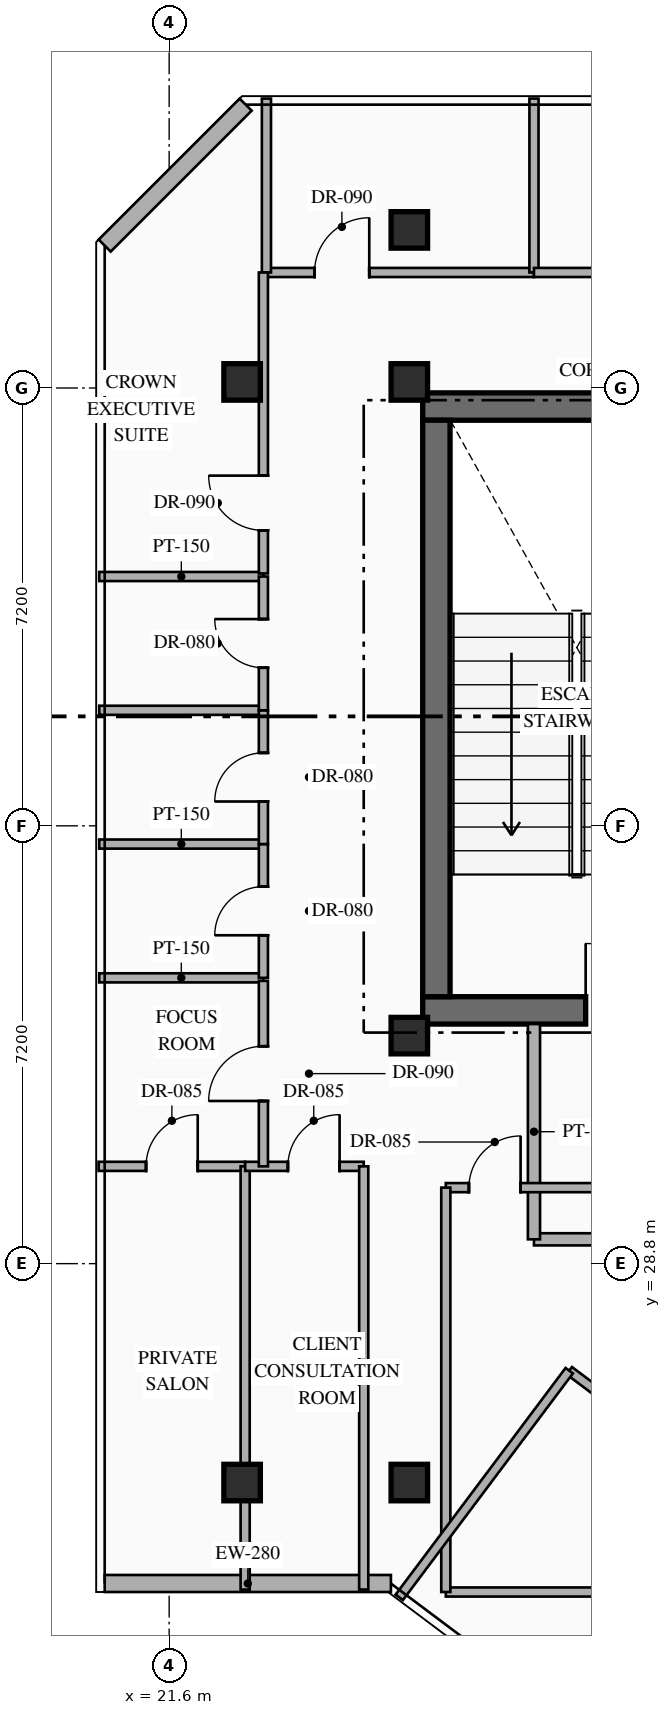
"""IFC4 building model, lengths in metres.
Left out: names, types, materials, properties, quantities, classifications, styles, units other than length and angle.
Written with IfcOpenShell. Run it as: python <this file> out.ifc"""

import sys

from ifc_helpers import new_model, si_unit, direction, frame, frame_2d, origin, origin_2d, place, context, subcontext, project, spatial, rectangle, hollow_rectangle, extrude, element, fill, save


model = new_model("IFC4")
c1 = context("Model", 3, precision=1e-05, world=origin(), true_north=direction((0.0, 1.0)))
c2 = subcontext(c1, "Body", "Model", "MODEL_VIEW")
j1 = project(units=[si_unit("LENGTHUNIT", "METRE"), si_unit("PLANEANGLEUNIT", "RADIAN")], contexts=[c1])
p1 = place(None, origin())
s1 = spatial("IfcSite", under=j1, at=p1, CompositionType="ELEMENT")
p2 = place(p1, origin())
s2 = spatial("IfcBuilding", under=s1, at=p2, CompositionType="ELEMENT")
p3 = place(p2, frame((0.0, 0.0, 273.95)))
s3 = spatial("IfcBuildingStorey", under=s2, at=p3, CompositionType="ELEMENT", Elevation=273.95)
p4 = place(p3, frame((25.77, 32.965, 0.0), z_axis=(0.0, 0.0, 1.0), x_axis=(1.0, 0.0, 0.0)))
e1 = element("IfcWall", 1, at=p4, inside=s3, PredefinedType="SHEAR", context=c2, shape_type="SweptSolid", body=[
    extrude(rectangle(XDim=7.48, YDim=0.45, at=frame_2d((3.74, 0.0))), origin(), (0.0, 0.0, 1.0), 4.0),
])
p5 = place(p4, frame((2.68, 0.0, 0.0)))
e2 = element("IfcOpeningElement", 2, at=p5, cuts=e1, PredefinedType="OPENING", context=c2, shape_type="SweptSolid", body=[
    extrude(rectangle(XDim=1.1, YDim=2.2, at=frame_2d((0.55, 1.1))), frame((0.0, 0.235, 0.0), z_axis=(0.0, -1.0, 0.0), x_axis=(1.0, 0.0, 0.0)), (0.0, 0.0, 1.0), 0.47),
])
p6 = place(p4, frame((5.43, 0.0, 0.0)))
e3 = element("IfcOpeningElement", 3, at=p6, cuts=e1, PredefinedType="OPENING", context=c2, shape_type="SweptSolid", body=[
    extrude(rectangle(XDim=1.1, YDim=2.15, at=frame_2d((0.55, 1.075))), frame((0.0, 0.235, 0.0), z_axis=(0.0, -1.0, 0.0), x_axis=(1.0, 0.0, 0.0)), (0.0, 0.0, 1.0), 0.47),
])
p7 = place(p3, frame((25.77, 42.895, 0.0), z_axis=(0.0, 0.0, 1.0), x_axis=(1.0, 0.0, 0.0)))
e4 = element("IfcWall", 4, at=p7, inside=s3, PredefinedType="SHEAR", context=c2, shape_type="SweptSolid", body=[
    extrude(rectangle(XDim=7.48, YDim=0.45, at=frame_2d((3.74, 0.0))), origin(), (0.0, 0.0, 1.0), 4.0),
])
p8 = place(p3, frame((25.995, 33.19, 0.0), z_axis=(0.0, 0.0, 1.0), x_axis=(0.0, 1.0, 0.0)))
e5 = element("IfcWall", 5, at=p8, inside=s3, PredefinedType="SHEAR", context=c2, shape_type="SweptSolid", body=[
    extrude(rectangle(XDim=9.48, YDim=0.45, at=frame_2d((4.74, 0.0))), origin(), (0.0, 0.0, 1.0), 4.0),
])
for number, where, z_axis, x_axis in (
    (6, (25.55, 32.55, 0.0), (0.0, 0.0, 1.0), (1.0, 0.0, 0.0)),
    (7, (25.55, 43.3, 0.0), (0.0, 0.0, 1.0), (1.0, 0.0, 0.0)),
    (8, (25.55, 25.2, 0.0), (0.0, 0.0, 1.0), (1.0, 0.0, 0.0)),
    (9, (25.55, 45.8, 0.0), (0.0, 0.0, 1.0), (1.0, 0.0, 0.0)),
    (10, (22.8, 25.2, 0.0), (0.0, 0.0, 1.0), (1.0, 0.0, 0.0)),
    (11, (22.8, 43.3, 0.0), (0.0, 0.0, 1.0), (1.0, 0.0, 0.0)),
):
    element("IfcColumn", number, at=place(p3, frame(where, z_axis=z_axis, x_axis=x_axis)), inside=s3, PredefinedType="COLUMN", context=c2, shape_type="SweptSolid", body=[
        extrude(hollow_rectangle(XDim=0.6, YDim=0.6, WallThickness=0.025, at=origin_2d()), origin(), (0.0, 0.0, 1.0), 4.0),
    ])
p9 = place(p3, frame((25.247, 23.54, 0.0), z_axis=(0.0, 0.0, 1.0), x_axis=(-1.0, 0.0, 0.0)))
e12 = element("IfcWall", 12, at=p9, inside=s3, PredefinedType="STANDARD", context=c2, shape_type="SweptSolid", body=[
    extrude(rectangle(XDim=4.707, YDim=0.28, at=frame_2d((2.354, 0.0))), origin(), (0.0, 0.0, 1.0), 3.75),
])
p10 = place(p3, frame((20.54, 45.542, 0.0), z_axis=(0.0, 0.0, 1.0), x_axis=(0.707069542501, 0.707144017911, 0.0)))
e13 = element("IfcWall", 13, at=p10, inside=s3, PredefinedType="STANDARD", context=c2, shape_type="SweptSolid", body=[
    extrude(rectangle(XDim=3.278, YDim=0.28, at=frame_2d((1.639, 0.0))), origin(), (0.0, 0.0, 1.0), 3.75),
])
p11 = place(p3, frame((27.6, 29.2, 0.0), z_axis=(0.0, 0.0, 1.0), x_axis=(1.0, 0.0, 0.0)))
e14 = element("IfcWall", 14, at=p11, inside=s3, PredefinedType="STANDARD", context=c2, shape_type="SweptSolid", body=[
    extrude(rectangle(XDim=5.15, YDim=0.2, at=frame_2d((2.575, 0.0))), origin(), (0.0, 0.0, 1.0), 3.75),
])
p12 = place(p3, frame((27.6, 29.2, 0.0), z_axis=(0.0, 0.0, 1.0), x_axis=(0.0, 1.0, 0.0)))
e15 = element("IfcWall", 15, at=p12, inside=s3, PredefinedType="STANDARD", context=c2, shape_type="SweptSolid", body=[
    extrude(rectangle(XDim=3.54, YDim=0.2, at=frame_2d((1.77, 0.0))), origin(), (0.0, 0.0, 1.0), 3.75),
])
for number, where, z_axis, x_axis in (
    (16, (20.45, 33.5, 0.0), (0.0, 0.0, 1.0), (1.0, 0.0, 0.0)),
    (17, (20.45, 40.1, 0.0), (0.0, 0.0, 1.0), (1.0, 0.0, 0.0)),
    (18, (20.45, 35.7, 0.0), (0.0, 0.0, 1.0), (1.0, 0.0, 0.0)),
    (19, (20.45, 37.9, 0.0), (0.0, 0.0, 1.0), (1.0, 0.0, 0.0)),
):
    element("IfcWall", number, at=place(p3, frame(where, z_axis=z_axis, x_axis=x_axis)), inside=s3, PredefinedType="PARTITIONING", context=c2, shape_type="SweptSolid", body=[
        extrude(rectangle(XDim=2.7, YDim=0.15, at=frame_2d((1.35, 0.0))), origin(), (0.0, 0.0, 1.0), 3.75),
    ])
p13 = place(p3, frame((23.15, 33.5, 0.0), z_axis=(0.0, 0.0, 1.0), x_axis=(0.0, 1.0, 0.0)))
e20 = element("IfcWall", 20, at=p13, inside=s3, PredefinedType="PARTITIONING", context=c2, shape_type="SweptSolid", body=[
    extrude(rectangle(XDim=2.2, YDim=0.15, at=frame_2d((1.1, 0.0))), origin(), (0.0, 0.0, 1.0), 3.75),
])
p14 = place(p13, frame((0.7, 0.0, 0.0)))
e21 = element("IfcOpeningElement", 21, at=p14, cuts=e20, PredefinedType="OPENING", context=c2, shape_type="SweptSolid", body=[
    extrude(rectangle(XDim=0.8, YDim=2.06, at=frame_2d((0.4, 1.03))), frame((0.0, 0.085, 0.0), z_axis=(0.0, -1.0, 0.0), x_axis=(1.0, 0.0, 0.0)), (0.0, 0.0, 1.0), 0.17),
])
p15 = place(p3, frame((23.15, 35.7, 0.0), z_axis=(0.0, 0.0, 1.0), x_axis=(0.0, 1.0, 0.0)))
e22 = element("IfcWall", 22, at=p15, inside=s3, PredefinedType="PARTITIONING", context=c2, shape_type="SweptSolid", body=[
    extrude(rectangle(XDim=2.2, YDim=0.15, at=frame_2d((1.1, 0.0))), origin(), (0.0, 0.0, 1.0), 3.75),
])
p16 = place(p15, frame((0.7, 0.0, 0.0)))
e23 = element("IfcOpeningElement", 23, at=p16, cuts=e22, PredefinedType="OPENING", context=c2, shape_type="SweptSolid", body=[
    extrude(rectangle(XDim=0.8, YDim=2.06, at=frame_2d((0.4, 1.03))), frame((0.0, 0.085, 0.0), z_axis=(0.0, -1.0, 0.0), x_axis=(1.0, 0.0, 0.0)), (0.0, 0.0, 1.0), 0.17),
])
p17 = place(p3, frame((23.15, 37.9, 0.0), z_axis=(0.0, 0.0, 1.0), x_axis=(0.0, 1.0, 0.0)))
e24 = element("IfcWall", 24, at=p17, inside=s3, PredefinedType="PARTITIONING", context=c2, shape_type="SweptSolid", body=[
    extrude(rectangle(XDim=2.2, YDim=0.15, at=frame_2d((1.1, 0.0))), origin(), (0.0, 0.0, 1.0), 3.75),
])
p18 = place(p17, frame((0.7, 0.0, 0.0)))
e25 = element("IfcOpeningElement", 25, at=p18, cuts=e24, PredefinedType="OPENING", context=c2, shape_type="SweptSolid", body=[
    extrude(rectangle(XDim=0.8, YDim=2.06, at=frame_2d((0.4, 1.03))), frame((0.0, 0.085, 0.0), z_axis=(0.0, -1.0, 0.0), x_axis=(1.0, 0.0, 0.0)), (0.0, 0.0, 1.0), 0.17),
])
p19 = place(p3, frame((26.15, 23.4, 0.0), z_axis=(0.0, 0.0, 1.0), x_axis=(1.0, 0.0, 0.0)))
e26 = element("IfcWall", 26, at=p19, inside=s3, PredefinedType="PARTITIONING", context=c2, shape_type="SweptSolid", body=[
    extrude(rectangle(XDim=7.7, YDim=0.15, at=frame_2d((3.85, 0.0))), origin(), (0.0, 0.0, 1.0), 3.75),
])
p20 = place(p3, frame((26.15, 30.05, 0.0), z_axis=(0.0, 0.0, 1.0), x_axis=(1.0, 0.0, 0.0)))
e27 = element("IfcWall", 27, at=p20, inside=s3, PredefinedType="PARTITIONING", context=c2, shape_type="SweptSolid", body=[
    extrude(rectangle(XDim=7.7, YDim=0.15, at=frame_2d((3.85, 0.0))), origin(), (0.0, 0.0, 1.0), 3.75),
])
p21 = place(p20, frame((0.38, 0.0, 0.0)))
e28 = element("IfcOpeningElement", 28, at=p21, cuts=e27, PredefinedType="OPENING", context=c2, shape_type="SweptSolid", body=[
    extrude(rectangle(XDim=0.85, YDim=2.08, at=frame_2d((0.425, 1.04))), frame((0.0, 0.085, 0.0), z_axis=(0.0, -1.0, 0.0), x_axis=(1.0, 0.0, 0.0)), (0.0, 0.0, 1.0), 0.17),
])
p22 = place(p3, frame((26.15, 23.4, 0.0), z_axis=(0.0, 0.0, 1.0), x_axis=(0.0, 1.0, 0.0)))
e29 = element("IfcWall", 29, at=p22, inside=s3, PredefinedType="PARTITIONING", context=c2, shape_type="SweptSolid", body=[
    extrude(rectangle(XDim=6.65, YDim=0.15, at=frame_2d((3.325, 0.0))), origin(), (0.0, 0.0, 1.0), 3.75),
])
p23 = place(p3, frame((23.2, 45.1, 0.0), z_axis=(0.0, 0.0, 1.0), x_axis=(1.0, 0.0, 0.0)))
e30 = element("IfcWall", 30, at=p23, inside=s3, PredefinedType="PARTITIONING", context=c2, shape_type="SweptSolid", body=[
    extrude(rectangle(XDim=4.4, YDim=0.15, at=frame_2d((2.2, 0.0))), origin(), (0.0, 0.0, 1.0), 3.75),
])
p24 = place(p23, frame((0.791, 0.0, 0.0)))
e31 = element("IfcOpeningElement", 31, at=p24, cuts=e30, PredefinedType="OPENING", context=c2, shape_type="SweptSolid", body=[
    extrude(rectangle(XDim=0.9, YDim=2.15, at=frame_2d((0.45, 1.075))), frame((0.0, 0.085, 0.0), z_axis=(0.0, -1.0, 0.0), x_axis=(1.0, 0.0, 0.0)), (0.0, 0.0, 1.0), 0.17),
])
for number, where, z_axis, x_axis in (
    (32, (23.2, 45.1, 0.0), (0.0, 0.0, 1.0), (0.0, 1.0, 0.0)),
    (33, (27.6, 45.1, 0.0), (0.0, 0.0, 1.0), (0.0, 1.0, 0.0)),
):
    element("IfcWall", number, at=place(p3, frame(where, z_axis=z_axis, x_axis=x_axis)), inside=s3, PredefinedType="PARTITIONING", context=c2, shape_type="SweptSolid", body=[
        extrude(rectangle(XDim=2.86, YDim=0.15, at=frame_2d((1.43, 0.0))), origin(), (0.0, 0.0, 1.0), 3.75),
    ])
p25 = place(p3, frame((27.6, 45.1, 0.0), z_axis=(0.0, 0.0, 1.0), x_axis=(1.0, 0.0, 0.0)))
e34 = element("IfcWall", 34, at=p25, inside=s3, PredefinedType="PARTITIONING", context=c2, shape_type="SweptSolid", body=[
    extrude(rectangle(XDim=5.8, YDim=0.15, at=frame_2d((2.9, 0.0))), origin(), (0.0, 0.0, 1.0), 3.75),
])
p26 = place(p25, frame((2.45, 0.0, 0.0)))
e35 = element("IfcOpeningElement", 35, at=p26, cuts=e34, PredefinedType="OPENING", context=c2, shape_type="SweptSolid", body=[
    extrude(rectangle(XDim=0.9, YDim=2.15, at=frame_2d((0.45, 1.075))), frame((0.0, 0.085, 0.0), z_axis=(0.0, -1.0, 0.0), x_axis=(1.0, 0.0, 0.0)), (0.0, 0.0, 1.0), 0.17),
])
p27 = place(p3, frame((28.18, 27.04, 0.0), z_axis=(0.0, 0.0, 1.0), x_axis=(0.8, -0.6, 0.0)))
e36 = element("IfcWall", 36, at=p27, inside=s3, PredefinedType="PARTITIONING", context=c2, shape_type="SweptSolid", body=[
    extrude(rectangle(XDim=17.76, YDim=0.15, at=frame_2d((8.88, 0.0))), origin(), (0.0, 0.0, 1.0), 3.75),
])
p28 = place(p27, frame((11.65, 0.0, 0.0)))
e37 = element("IfcOpeningElement", 37, at=p28, cuts=e36, PredefinedType="OPENING", context=c2, shape_type="SweptSolid", body=[
    extrude(rectangle(XDim=0.9, YDim=2.15, at=frame_2d((0.45, 1.075))), frame((0.0, 0.085, 0.0), z_axis=(0.0, -1.0, 0.0), x_axis=(1.0, 0.0, 0.0)), (0.0, 0.0, 1.0), 0.17),
])
p29 = place(p3, frame((25.384, 23.312, 0.0), z_axis=(0.0, 0.0, 1.0), x_axis=(0.599983234706, 0.800012573696, 0.0)))
e38 = element("IfcWall", 38, at=p29, inside=s3, PredefinedType="PARTITIONING", context=c2, shape_type="SweptSolid", body=[
    extrude(rectangle(XDim=4.66, YDim=0.15, at=frame_2d((2.33, 0.0))), origin(), (0.0, 0.0, 1.0), 3.75),
])
p30 = place(p3, frame((20.44, 30.4, 0.0), z_axis=(0.0, 0.0, 1.0), x_axis=(1.0, 0.0, 0.0)))
e39 = element("IfcWall", 39, at=p30, inside=s3, PredefinedType="PARTITIONING", context=c2, shape_type="SweptSolid", body=[
    extrude(rectangle(XDim=2.41, YDim=0.15, at=frame_2d((1.205, 0.0))), origin(), (0.0, 0.0, 1.0), 3.75),
])
p31 = place(p30, frame((0.78, 0.0, 0.0)))
e40 = element("IfcOpeningElement", 40, at=p31, cuts=e39, PredefinedType="OPENING", context=c2, shape_type="SweptSolid", body=[
    extrude(rectangle(XDim=0.85, YDim=2.08, at=frame_2d((0.425, 1.04))), frame((0.0, 0.085, 0.0), z_axis=(0.0, -1.0, 0.0), x_axis=(1.0, 0.0, 0.0)), (0.0, 0.0, 1.0), 0.17),
])
p32 = place(p3, frame((22.85, 23.44, 0.0), z_axis=(0.0, 0.0, 1.0), x_axis=(0.0, 1.0, 0.0)))
e41 = element("IfcWall", 41, at=p32, inside=s3, PredefinedType="PARTITIONING", context=c2, shape_type="SweptSolid", body=[
    extrude(rectangle(XDim=6.96, YDim=0.15, at=frame_2d((3.48, 0.0))), origin(), (0.0, 0.0, 1.0), 3.295),
])
p33 = place(p3, frame((22.85, 30.4, 0.0), z_axis=(0.0, 0.0, 1.0), x_axis=(1.0, 0.0, 0.0)))
e42 = element("IfcWall", 42, at=p33, inside=s3, PredefinedType="PARTITIONING", context=c2, shape_type="SweptSolid", body=[
    extrude(rectangle(XDim=1.95, YDim=0.15, at=frame_2d((0.975, 0.0))), origin(), (0.0, 0.0, 1.0), 3.75),
])
p34 = place(p33, frame((0.703, 0.0, 0.0)))
e43 = element("IfcOpeningElement", 43, at=p34, cuts=e42, PredefinedType="OPENING", context=c2, shape_type="SweptSolid", body=[
    extrude(rectangle(XDim=0.85, YDim=2.08, at=frame_2d((0.425, 1.04))), frame((0.0, 0.085, 0.0), z_axis=(0.0, -1.0, 0.0), x_axis=(1.0, 0.0, 0.0)), (0.0, 0.0, 1.0), 0.17),
])
p35 = place(p3, frame((24.8, 23.44, 0.0), z_axis=(0.0, 0.0, 1.0), x_axis=(0.0, 1.0, 0.0)))
e44 = element("IfcWall", 44, at=p35, inside=s3, PredefinedType="PARTITIONING", context=c2, shape_type="SweptSolid", body=[
    extrude(rectangle(XDim=6.96, YDim=0.15, at=frame_2d((3.48, 0.0))), origin(), (0.0, 0.0, 1.0), 3.75),
])
p36 = place(p3, frame((23.15, 30.4, 0.0), z_axis=(0.0, 0.0, 1.0), x_axis=(0.0, 1.0, 0.0)))
e45 = element("IfcWall", 45, at=p36, inside=s3, PredefinedType="PARTITIONING", context=c2, shape_type="SweptSolid", body=[
    extrude(rectangle(XDim=3.05, YDim=0.15, at=frame_2d((1.525, 0.0))), origin(), (0.0, 0.0, 1.0), 3.75),
])
p37 = place(p36, frame((1.075, 0.0, 0.0)))
e46 = element("IfcOpeningElement", 46, at=p37, cuts=e45, PredefinedType="OPENING", context=c2, shape_type="SweptSolid", body=[
    extrude(rectangle(XDim=0.9, YDim=2.15, at=frame_2d((0.45, 1.075))), frame((0.0, 0.085, 0.0), z_axis=(0.0, -1.0, 0.0), x_axis=(1.0, 0.0, 0.0)), (0.0, 0.0, 1.0), 0.17),
])
p38 = place(p3, frame((23.15, 40.15, 0.0), z_axis=(0.0, 0.0, 1.0), x_axis=(0.0, 1.0, 0.0)))
e47 = element("IfcWall", 47, at=p38, inside=s3, PredefinedType="PARTITIONING", context=c2, shape_type="SweptSolid", body=[
    extrude(rectangle(XDim=4.95, YDim=0.15, at=frame_2d((2.475, 0.0))), origin(), (0.0, 0.0, 1.0), 3.75),
])
p39 = place(p38, frame((0.709, 0.0, 0.0)))
e48 = element("IfcOpeningElement", 48, at=p39, cuts=e47, PredefinedType="OPENING", context=c2, shape_type="SweptSolid", body=[
    extrude(rectangle(XDim=0.9, YDim=2.15, at=frame_2d((0.45, 1.075))), frame((0.0, 0.085, 0.0), z_axis=(0.0, -1.0, 0.0), x_axis=(1.0, 0.0, 0.0)), (0.0, 0.0, 1.0), 0.17),
])
p40 = place(p5, origin())
e49 = element("IfcDoor", 49, at=p40, inside=s3, OperationType="SINGLE_SWING_LEFT", PredefinedType="DOOR", context=c2, shape_type="SweptSolid", body=[
    extrude(rectangle(XDim=1.1, YDim=2.2, at=frame_2d((0.55, 1.1))), frame((0.0, 0.025, 0.0), z_axis=(0.0, -1.0, 0.0), x_axis=(1.0, 0.0, 0.0)), (0.0, 0.0, 1.0), 0.05),
])
fill(e2, e49)
p41 = place(p14, origin())
e50 = element("IfcDoor", 50, at=p41, inside=s3, OperationType="SINGLE_SWING_LEFT", PredefinedType="DOOR", context=c2, shape_type="SweptSolid", body=[
    extrude(rectangle(XDim=0.8, YDim=2.06, at=frame_2d((0.4, 1.03))), frame((0.0, 0.025, 0.0), z_axis=(0.0, -1.0, 0.0), x_axis=(1.0, 0.0, 0.0)), (0.0, 0.0, 1.0), 0.05),
])
fill(e21, e50)
p42 = place(p16, origin())
e51 = element("IfcDoor", 51, at=p42, inside=s3, OperationType="SINGLE_SWING_LEFT", PredefinedType="DOOR", context=c2, shape_type="SweptSolid", body=[
    extrude(rectangle(XDim=0.8, YDim=2.06, at=frame_2d((0.4, 1.03))), frame((0.0, 0.025, 0.0), z_axis=(0.0, -1.0, 0.0), x_axis=(1.0, 0.0, 0.0)), (0.0, 0.0, 1.0), 0.05),
])
fill(e23, e51)
p43 = place(p18, origin())
e52 = element("IfcDoor", 52, at=p43, inside=s3, OperationType="SINGLE_SWING_RIGHT", PredefinedType="DOOR", context=c2, shape_type="SweptSolid", body=[
    extrude(rectangle(XDim=0.8, YDim=2.06, at=frame_2d((0.4, 1.03))), frame((0.0, 0.025, 0.0), z_axis=(0.0, -1.0, 0.0), x_axis=(1.0, 0.0, 0.0)), (0.0, 0.0, 1.0), 0.05),
])
fill(e25, e52)
p44 = place(p21, origin())
e53 = element("IfcDoor", 53, at=p44, inside=s3, OperationType="SINGLE_SWING_RIGHT", PredefinedType="DOOR", context=c2, shape_type="SweptSolid", body=[
    extrude(rectangle(XDim=0.85, YDim=2.08, at=frame_2d((0.425, 1.04))), frame((0.0, 0.025, 0.0), z_axis=(0.0, -1.0, 0.0), x_axis=(1.0, 0.0, 0.0)), (0.0, 0.0, 1.0), 0.05),
])
fill(e28, e53)
p45 = place(p24, origin())
e54 = element("IfcDoor", 54, at=p45, inside=s3, OperationType="SINGLE_SWING_RIGHT", PredefinedType="DOOR", context=c2, shape_type="SweptSolid", body=[
    extrude(rectangle(XDim=0.9, YDim=2.15, at=frame_2d((0.45, 1.075))), frame((0.0, 0.025, 0.0), z_axis=(0.0, -1.0, 0.0), x_axis=(1.0, 0.0, 0.0)), (0.0, 0.0, 1.0), 0.05),
])
fill(e31, e54)
p46 = place(p31, origin())
e55 = element("IfcDoor", 55, at=p46, inside=s3, OperationType="SINGLE_SWING_RIGHT", PredefinedType="DOOR", context=c2, shape_type="SweptSolid", body=[
    extrude(rectangle(XDim=0.85, YDim=2.08, at=frame_2d((0.425, 1.04))), frame((0.0, 0.025, 0.0), z_axis=(0.0, -1.0, 0.0), x_axis=(1.0, 0.0, 0.0)), (0.0, 0.0, 1.0), 0.05),
])
fill(e40, e55)
p47 = place(p34, origin())
e56 = element("IfcDoor", 56, at=p47, inside=s3, OperationType="SINGLE_SWING_RIGHT", PredefinedType="DOOR", context=c2, shape_type="SweptSolid", body=[
    extrude(rectangle(XDim=0.85, YDim=2.08, at=frame_2d((0.425, 1.04))), frame((0.0, 0.025, 0.0), z_axis=(0.0, -1.0, 0.0), x_axis=(1.0, 0.0, 0.0)), (0.0, 0.0, 1.0), 0.05),
])
fill(e43, e56)
p48 = place(p37, origin())
e57 = element("IfcDoor", 57, at=p48, inside=s3, OperationType="SINGLE_SWING_LEFT", PredefinedType="DOOR", context=c2, shape_type="SweptSolid", body=[
    extrude(rectangle(XDim=0.9, YDim=2.15, at=frame_2d((0.45, 1.075))), frame((0.0, 0.025, 0.0), z_axis=(0.0, -1.0, 0.0), x_axis=(1.0, 0.0, 0.0)), (0.0, 0.0, 1.0), 0.05),
])
fill(e46, e57)
p49 = place(p39, origin())
e58 = element("IfcDoor", 58, at=p49, inside=s3, OperationType="SINGLE_SWING_RIGHT", PredefinedType="DOOR", context=c2, shape_type="SweptSolid", body=[
    extrude(rectangle(XDim=0.9, YDim=2.15, at=frame_2d((0.45, 1.075))), frame((0.0, 0.025, 0.0), z_axis=(0.0, -1.0, 0.0), x_axis=(1.0, 0.0, 0.0)), (0.0, 0.0, 1.0), 0.05),
])
fill(e48, e58)
save(model, sys.argv[1])
